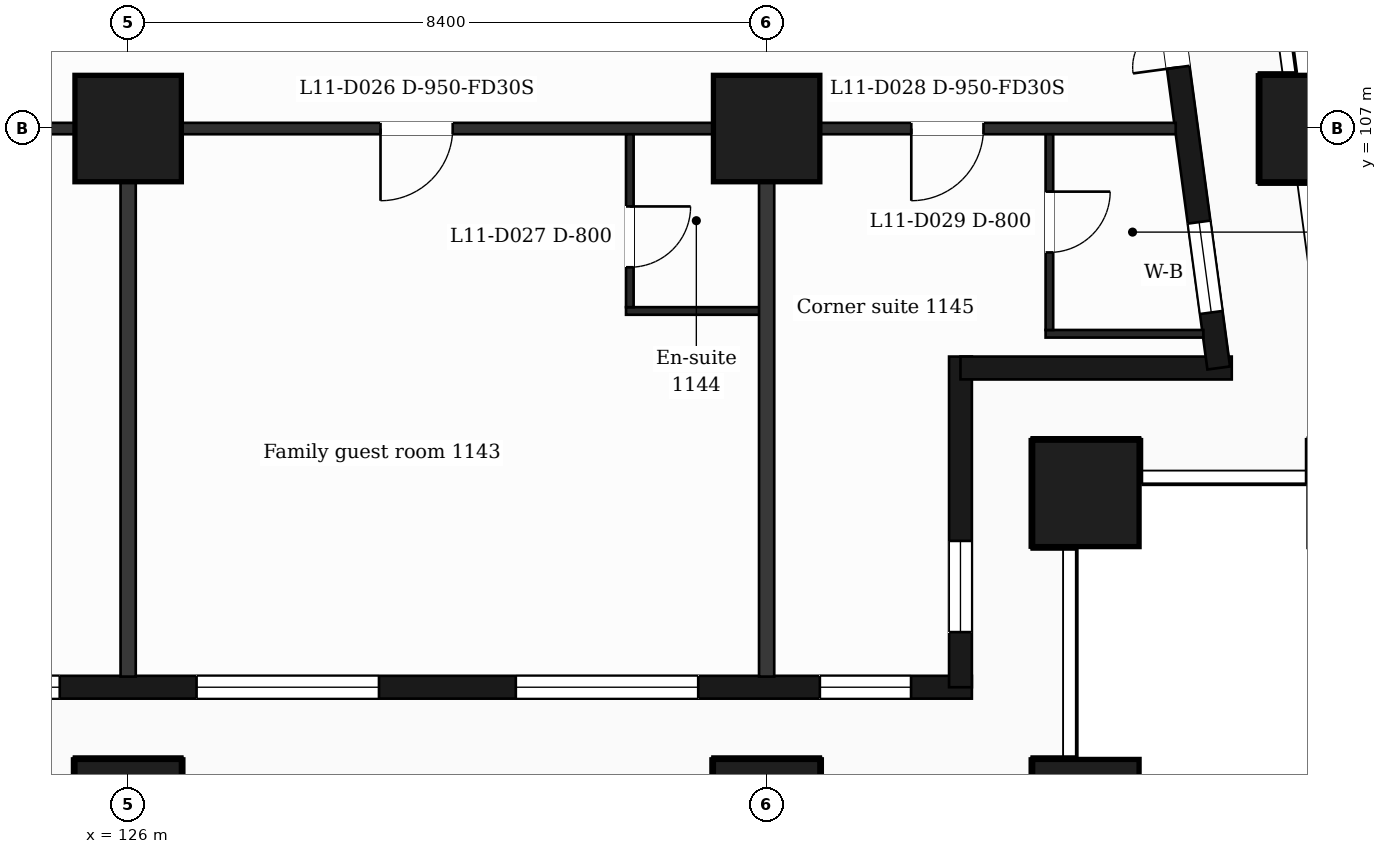
"""IFC4 building model, lengths in metres.
Left out: names, types, materials, properties, quantities, classifications, styles, units other than length and angle.
Written with IfcOpenShell. Run it as: python <this file> out.ifc"""

import sys

from ifc_helpers import new_model, si_unit, direction, frame, frame_2d, origin, origin_2d, place, context, subcontext, project, spatial, rectangle, extrude, element, fill, save


model = new_model("IFC4")
c1 = context("Model", 3, precision=1e-05, world=origin(), true_north=direction((0.0, 1.0)))
c2 = subcontext(c1, "Body", "Model", "MODEL_VIEW")
j1 = project(units=[si_unit("LENGTHUNIT", "METRE"), si_unit("PLANEANGLEUNIT", "RADIAN")], contexts=[c1])
p1 = place(None, origin())
s1 = spatial("IfcSite", under=j1, at=p1, CompositionType="ELEMENT")
p2 = place(p1, origin())
s2 = spatial("IfcBuilding", under=s1, at=p2, CompositionType="ELEMENT")
p3 = place(p2, frame((0.0, 0.0, 56.5)))
s3 = spatial("IfcBuildingStorey", under=s2, at=p3, CompositionType="ELEMENT", Elevation=56.5)
for number, where, z_axis, x_axis in (
    (1, (126.0, 98.0, 0.0), (0.0, 0.0, 1.0), (1.0, 0.0, 0.0)),
    (2, (134.4, 98.0, 0.0), (0.0, 0.0, 1.0), (1.0, 0.0, 0.0)),
    (3, (138.6, 98.0, 0.0), (0.0, 0.0, 1.0), (1.0, 0.0, 0.0)),
    (4, (138.6, 102.2, 0.0), (0.0, 0.0, 1.0), (1.0, 0.0, 0.0)),
    (5, (126.0, 107.0, 0.0), (0.0, 0.0, 1.0), (1.0, 0.0, 0.0)),
    (6, (134.4, 107.0, 0.0), (0.0, 0.0, 1.0), (1.0, 0.0, 0.0)),
    (7, (141.588, 107.0, 0.0), (0.0, 0.0, 1.0), (1.0, 0.0, 0.0)),
):
    element("IfcColumn", number, at=place(p3, frame(where, z_axis=z_axis, x_axis=x_axis)), inside=s3, PredefinedType="COLUMN", context=c2, shape_type="SweptSolid", body=[
        extrude(rectangle(XDim=1.4, YDim=1.4, at=origin_2d()), origin(), (0.0, 0.0, 1.0), 3.5),
    ])
p4 = place(p3, frame((89.85, 99.65, 0.0), z_axis=(0.0, 0.0, 1.0), x_axis=(1.0, 0.0, 0.0)))
e8 = element("IfcWall", 8, at=p4, inside=s3, PredefinedType="SOLIDWALL", context=c2, shape_type="SweptSolid", body=[
    extrude(rectangle(XDim=47.25, YDim=0.3, at=frame_2d((23.625, 0.0))), origin(), (0.0, 0.0, 1.0), 3.18),
])
p5 = place(p4, frame((0.725, 0.0, 0.9)))
e9 = element("IfcOpeningElement", 9, at=p5, cuts=e8, PredefinedType="OPENING", context=c2, shape_type="SweptSolid", body=[
    extrude(rectangle(XDim=1.2, YDim=2.1, at=frame_2d((0.6, 1.05))), frame((0.0, 0.16, 0.0), z_axis=(0.0, -1.0, 0.0), x_axis=(1.0, 0.0, 0.0)), (0.0, 0.0, 1.0), 0.32),
])
p6 = place(p4, frame((3.45, 0.0, 0.9)))
e10 = element("IfcOpeningElement", 10, at=p6, cuts=e8, PredefinedType="OPENING", context=c2, shape_type="SweptSolid", body=[
    extrude(rectangle(XDim=2.4, YDim=2.1, at=frame_2d((1.2, 1.05))), frame((0.0, 0.16, 0.0), z_axis=(0.0, -1.0, 0.0), x_axis=(1.0, 0.0, 0.0)), (0.0, 0.0, 1.0), 0.32),
])
p7 = place(p4, frame((7.35, 0.0, 0.0)))
e11 = element("IfcOpeningElement", 11, at=p7, cuts=e8, PredefinedType="OPENING", context=c2, shape_type="SweptSolid", body=[
    extrude(rectangle(XDim=1.2, YDim=2.4, at=frame_2d((0.6, 1.2))), frame((0.0, 0.16, 0.0), z_axis=(0.0, -1.0, 0.0), x_axis=(1.0, 0.0, 0.0)), (0.0, 0.0, 1.0), 0.32),
])
p8 = place(p4, frame((9.15, 0.0, 0.9)))
e12 = element("IfcOpeningElement", 12, at=p8, cuts=e8, PredefinedType="OPENING", context=c2, shape_type="SweptSolid", body=[
    extrude(rectangle(XDim=1.2, YDim=2.1, at=frame_2d((0.6, 1.05))), frame((0.0, 0.16, 0.0), z_axis=(0.0, -1.0, 0.0), x_axis=(1.0, 0.0, 0.0)), (0.0, 0.0, 1.0), 0.32),
])
p9 = place(p4, frame((11.85, 0.0, 0.9)))
e13 = element("IfcOpeningElement", 13, at=p9, cuts=e8, PredefinedType="OPENING", context=c2, shape_type="SweptSolid", body=[
    extrude(rectangle(XDim=2.4, YDim=2.1, at=frame_2d((1.2, 1.05))), frame((0.0, 0.16, 0.0), z_axis=(0.0, -1.0, 0.0), x_axis=(1.0, 0.0, 0.0)), (0.0, 0.0, 1.0), 0.32),
])
p10 = place(p4, frame((16.05, 0.0, 0.9)))
e14 = element("IfcOpeningElement", 14, at=p10, cuts=e8, PredefinedType="OPENING", context=c2, shape_type="SweptSolid", body=[
    extrude(rectangle(XDim=2.4, YDim=2.1, at=frame_2d((1.2, 1.05))), frame((0.0, 0.16, 0.0), z_axis=(0.0, -1.0, 0.0), x_axis=(1.0, 0.0, 0.0)), (0.0, 0.0, 1.0), 0.32),
])
p11 = place(p4, frame((20.85, 0.0, 0.9)))
e15 = element("IfcOpeningElement", 15, at=p11, cuts=e8, PredefinedType="OPENING", context=c2, shape_type="SweptSolid", body=[
    extrude(rectangle(XDim=1.2, YDim=2.1, at=frame_2d((0.6, 1.05))), frame((0.0, 0.16, 0.0), z_axis=(0.0, -1.0, 0.0), x_axis=(1.0, 0.0, 0.0)), (0.0, 0.0, 1.0), 0.32),
])
p12 = place(p4, frame((25.05, 0.0, 0.9)))
e16 = element("IfcOpeningElement", 16, at=p12, cuts=e8, PredefinedType="OPENING", context=c2, shape_type="SweptSolid", body=[
    extrude(rectangle(XDim=1.2, YDim=2.1, at=frame_2d((0.6, 1.05))), frame((0.0, 0.16, 0.0), z_axis=(0.0, -1.0, 0.0), x_axis=(1.0, 0.0, 0.0)), (0.0, 0.0, 1.0), 0.32),
])
p13 = place(p4, frame((28.65, 0.0, 0.9)))
e17 = element("IfcOpeningElement", 17, at=p13, cuts=e8, PredefinedType="OPENING", context=c2, shape_type="SweptSolid", body=[
    extrude(rectangle(XDim=2.4, YDim=2.1, at=frame_2d((1.2, 1.05))), frame((0.0, 0.16, 0.0), z_axis=(0.0, -1.0, 0.0), x_axis=(1.0, 0.0, 0.0)), (0.0, 0.0, 1.0), 0.32),
])
p14 = place(p4, frame((32.85, 0.0, 0.9)))
e18 = element("IfcOpeningElement", 18, at=p14, cuts=e8, PredefinedType="OPENING", context=c2, shape_type="SweptSolid", body=[
    extrude(rectangle(XDim=2.4, YDim=2.1, at=frame_2d((1.2, 1.05))), frame((0.0, 0.16, 0.0), z_axis=(0.0, -1.0, 0.0), x_axis=(1.0, 0.0, 0.0)), (0.0, 0.0, 1.0), 0.32),
])
p15 = place(p4, frame((37.05, 0.0, 0.9)))
e19 = element("IfcOpeningElement", 19, at=p15, cuts=e8, PredefinedType="OPENING", context=c2, shape_type="SweptSolid", body=[
    extrude(rectangle(XDim=2.4, YDim=2.1, at=frame_2d((1.2, 1.05))), frame((0.0, 0.16, 0.0), z_axis=(0.0, -1.0, 0.0), x_axis=(1.0, 0.0, 0.0)), (0.0, 0.0, 1.0), 0.32),
])
p16 = place(p4, frame((41.25, 0.0, 0.9)))
e20 = element("IfcOpeningElement", 20, at=p16, cuts=e8, PredefinedType="OPENING", context=c2, shape_type="SweptSolid", body=[
    extrude(rectangle(XDim=2.4, YDim=2.1, at=frame_2d((1.2, 1.05))), frame((0.0, 0.16, 0.0), z_axis=(0.0, -1.0, 0.0), x_axis=(1.0, 0.0, 0.0)), (0.0, 0.0, 1.0), 0.32),
])
p17 = place(p4, frame((45.25, 0.0, 0.9)))
e21 = element("IfcOpeningElement", 21, at=p17, cuts=e8, PredefinedType="OPENING", context=c2, shape_type="SweptSolid", body=[
    extrude(rectangle(XDim=1.2, YDim=2.1, at=frame_2d((0.6, 1.05))), frame((0.0, 0.16, 0.0), z_axis=(0.0, -1.0, 0.0), x_axis=(1.0, 0.0, 0.0)), (0.0, 0.0, 1.0), 0.32),
])
p18 = place(p3, frame((136.95, 99.65, 0.0), z_axis=(0.0, 0.0, 1.0), x_axis=(0.0, 1.0, 0.0)))
e22 = element("IfcWall", 22, at=p18, inside=s3, PredefinedType="SOLIDWALL", context=c2, shape_type="SweptSolid", body=[
    extrude(rectangle(XDim=4.35, YDim=0.3, at=frame_2d((2.175, 0.0))), origin(), (0.0, 0.0, 1.0), 3.18),
])
p19 = place(p18, frame((0.725, 0.0, 0.9)))
e23 = element("IfcOpeningElement", 23, at=p19, cuts=e22, PredefinedType="OPENING", context=c2, shape_type="SweptSolid", body=[
    extrude(rectangle(XDim=1.2, YDim=2.1, at=frame_2d((0.6, 1.05))), frame((0.0, 0.16, 0.0), z_axis=(0.0, -1.0, 0.0), x_axis=(1.0, 0.0, 0.0)), (0.0, 0.0, 1.0), 0.32),
])
p20 = place(p3, frame((136.95, 103.85, 0.0), z_axis=(0.0, 0.0, 1.0), x_axis=(1.0, 0.0, 0.0)))
e24 = element("IfcWall", 24, at=p20, inside=s3, PredefinedType="SOLIDWALL", context=c2, shape_type="SweptSolid", body=[
    extrude(rectangle(XDim=3.569, YDim=0.3, at=frame_2d((1.785, 0.0))), origin(), (0.0, 0.0, 1.0), 3.18),
])
p21 = place(p3, frame((140.348, 103.85, 0.0), z_axis=(0.0, 0.0, 1.0), x_axis=(-0.133431549479, 0.991058031401, 0.0)))
e25 = element("IfcWall", 25, at=p21, inside=s3, PredefinedType="SOLIDWALL", context=c2, shape_type="SweptSolid", body=[
    extrude(rectangle(XDim=6.609, YDim=0.3, at=frame_2d((3.304, 0.0))), origin(), (0.0, 0.0, 1.0), 3.18),
])
p22 = place(p21, frame((0.737, 0.0, 0.9)))
e26 = element("IfcOpeningElement", 26, at=p22, cuts=e25, PredefinedType="OPENING", context=c2, shape_type="SweptSolid", body=[
    extrude(rectangle(XDim=1.2, YDim=2.1, at=frame_2d((0.6, 1.05))), frame((0.0, 0.16, 0.0), z_axis=(0.0, -1.0, 0.0), x_axis=(1.0, 0.0, 0.0)), (0.0, 0.0, 1.0), 0.32),
])
p23 = place(p21, frame((3.991, 0.0, 0.0)))
e27 = element("IfcOpeningElement", 27, at=p23, cuts=e25, PredefinedType="OPENING", context=c2, shape_type="SweptSolid", body=[
    extrude(rectangle(XDim=1.2, YDim=2.4, at=frame_2d((0.6, 1.2))), frame((0.0, 0.16, 0.0), z_axis=(0.0, -1.0, 0.0), x_axis=(1.0, 0.0, 0.0)), (0.0, 0.0, 1.0), 0.32),
])
p24 = place(p3, frame((138.07, 104.3, 0.0), z_axis=(0.0, 0.0, 1.0), x_axis=(1.0, 0.0, 0.0)))
e28 = element("IfcWall", 28, at=p24, inside=s3, PredefinedType="PARTITIONING", context=c2, shape_type="SweptSolid", body=[
    extrude(rectangle(XDim=2.076, YDim=0.1, at=frame_2d((1.038, 0.0))), origin(), (0.0, 0.0, 1.0), 3.18),
])
p25 = place(p3, frame((132.55, 104.6, 0.0), z_axis=(0.0, 0.0, 1.0), x_axis=(1.0, 0.0, 0.0)))
e29 = element("IfcWall", 29, at=p25, inside=s3, PredefinedType="PARTITIONING", context=c2, shape_type="SweptSolid", body=[
    extrude(rectangle(XDim=1.85, YDim=0.1, at=frame_2d((0.925, 0.0))), origin(), (0.0, 0.0, 1.0), 3.18),
])
p26 = place(p3, frame((87.018, 107.0, 0.0), z_axis=(0.0, 0.0, 1.0), x_axis=(1.0, 0.0, 0.0)))
e30 = element("IfcWall", 30, at=p26, inside=s3, PredefinedType="PARTITIONING", context=c2, shape_type="SweptSolid", body=[
    extrude(rectangle(XDim=52.765, YDim=0.15, at=frame_2d((26.382, 0.0))), origin(), (0.0, 0.0, 1.0), 3.18),
])
p27 = place(p26, frame((1.032, 0.0, 0.0)))
e31 = element("IfcOpeningElement", 31, at=p27, cuts=e30, PredefinedType="OPENING", context=c2, shape_type="SweptSolid", body=[
    extrude(rectangle(XDim=0.95, YDim=2.1, at=frame_2d((0.475, 1.05))), frame((0.0, 0.085, 0.0), z_axis=(0.0, -1.0, 0.0), x_axis=(1.0, 0.0, 0.0)), (0.0, 0.0, 1.0), 0.17),
])
p28 = place(p26, frame((6.894, 0.0, 0.0)))
e32 = element("IfcOpeningElement", 32, at=p28, cuts=e30, PredefinedType="OPENING", context=c2, shape_type="SweptSolid", body=[
    extrude(rectangle(XDim=0.95, YDim=2.1, at=frame_2d((0.475, 1.05))), frame((0.0, 0.085, 0.0), z_axis=(0.0, -1.0, 0.0), x_axis=(1.0, 0.0, 0.0)), (0.0, 0.0, 1.0), 0.17),
])
p29 = place(p26, frame((17.844, 0.0, 0.0)))
e33 = element("IfcOpeningElement", 33, at=p29, cuts=e30, PredefinedType="OPENING", context=c2, shape_type="SweptSolid", body=[
    extrude(rectangle(XDim=0.95, YDim=2.1, at=frame_2d((0.475, 1.05))), frame((0.0, 0.085, 0.0), z_axis=(0.0, -1.0, 0.0), x_axis=(1.0, 0.0, 0.0)), (0.0, 0.0, 1.0), 0.17),
])
p30 = place(p26, frame((26.245, 0.0, 0.0)))
e34 = element("IfcOpeningElement", 34, at=p30, cuts=e30, PredefinedType="OPENING", context=c2, shape_type="SweptSolid", body=[
    extrude(rectangle(XDim=0.95, YDim=2.1, at=frame_2d((0.475, 1.05))), frame((0.0, 0.085, 0.0), z_axis=(0.0, -1.0, 0.0), x_axis=(1.0, 0.0, 0.0)), (0.0, 0.0, 1.0), 0.17),
])
p31 = place(p26, frame((35.822, 0.0, 0.0)))
e35 = element("IfcOpeningElement", 35, at=p31, cuts=e30, PredefinedType="OPENING", context=c2, shape_type="SweptSolid", body=[
    extrude(rectangle(XDim=0.95, YDim=2.1, at=frame_2d((0.475, 1.05))), frame((0.0, 0.085, 0.0), z_axis=(0.0, -1.0, 0.0), x_axis=(1.0, 0.0, 0.0)), (0.0, 0.0, 1.0), 0.17),
])
p32 = place(p26, frame((42.302, 0.0, 0.0)))
e36 = element("IfcOpeningElement", 36, at=p32, cuts=e30, PredefinedType="OPENING", context=c2, shape_type="SweptSolid", body=[
    extrude(rectangle(XDim=0.95, YDim=2.1, at=frame_2d((0.475, 1.05))), frame((0.0, 0.085, 0.0), z_axis=(0.0, -1.0, 0.0), x_axis=(1.0, 0.0, 0.0)), (0.0, 0.0, 1.0), 0.17),
])
p33 = place(p26, frame((49.285, 0.0, 0.0)))
e37 = element("IfcOpeningElement", 37, at=p33, cuts=e30, PredefinedType="OPENING", context=c2, shape_type="SweptSolid", body=[
    extrude(rectangle(XDim=0.95, YDim=2.1, at=frame_2d((0.475, 1.05))), frame((0.0, 0.085, 0.0), z_axis=(0.0, -1.0, 0.0), x_axis=(1.0, 0.0, 0.0)), (0.0, 0.0, 1.0), 0.17),
])
p34 = place(p3, frame((126.0, 99.79, 0.0), z_axis=(0.0, 0.0, 1.0), x_axis=(0.0, 1.0, 0.0)))
e38 = element("IfcWall", 38, at=p34, inside=s3, PredefinedType="PARTITIONING", context=c2, shape_type="SweptSolid", body=[
    extrude(rectangle(XDim=7.135, YDim=0.2, at=frame_2d((3.567, 0.0))), origin(), (0.0, 0.0, 1.0), 3.18),
])
p35 = place(p3, frame((132.6, 104.65, 0.0), z_axis=(0.0, 0.0, 1.0), x_axis=(0.0, 1.0, 0.0)))
e39 = element("IfcWall", 39, at=p35, inside=s3, PredefinedType="PARTITIONING", context=c2, shape_type="SweptSolid", body=[
    extrude(rectangle(XDim=2.275, YDim=0.1, at=frame_2d((1.138, 0.0))), origin(), (0.0, 0.0, 1.0), 3.18),
])
p36 = place(p35, frame((0.525, 0.0, 0.0)))
e40 = element("IfcOpeningElement", 40, at=p36, cuts=e39, PredefinedType="OPENING", context=c2, shape_type="SweptSolid", body=[
    extrude(rectangle(XDim=0.8, YDim=2.1, at=frame_2d((0.4, 1.05))), frame((0.0, 0.06, 0.0), z_axis=(0.0, -1.0, 0.0), x_axis=(1.0, 0.0, 0.0)), (0.0, 0.0, 1.0), 0.12),
])
p37 = place(p3, frame((134.4, 99.79, 0.0), z_axis=(0.0, 0.0, 1.0), x_axis=(0.0, 1.0, 0.0)))
e41 = element("IfcWall", 41, at=p37, inside=s3, PredefinedType="PARTITIONING", context=c2, shape_type="SweptSolid", body=[
    extrude(rectangle(XDim=7.135, YDim=0.2, at=frame_2d((3.567, 0.0))), origin(), (0.0, 0.0, 1.0), 3.18),
])
p38 = place(p3, frame((138.12, 104.35, 0.0), z_axis=(0.0, 0.0, 1.0), x_axis=(0.0, 1.0, 0.0)))
e42 = element("IfcWall", 42, at=p38, inside=s3, PredefinedType="PARTITIONING", context=c2, shape_type="SweptSolid", body=[
    extrude(rectangle(XDim=2.575, YDim=0.1, at=frame_2d((1.288, 0.0))), origin(), (0.0, 0.0, 1.0), 3.18),
])
p39 = place(p38, frame((1.02, 0.0, 0.0)))
e43 = element("IfcOpeningElement", 43, at=p39, cuts=e42, PredefinedType="OPENING", context=c2, shape_type="SweptSolid", body=[
    extrude(rectangle(XDim=0.8, YDim=2.1, at=frame_2d((0.4, 1.05))), frame((0.0, 0.06, 0.0), z_axis=(0.0, -1.0, 0.0), x_axis=(1.0, 0.0, 0.0)), (0.0, 0.0, 1.0), 0.12),
])
p40 = place(p14, origin())
e44 = element("IfcWindow", 44, at=p40, inside=s3, PartitioningType="SINGLE_PANEL", PredefinedType="WINDOW", context=c2, shape_type="SweptSolid", body=[
    extrude(rectangle(XDim=2.4, YDim=2.1, at=frame_2d((1.2, 1.05))), frame((0.0, 0.03, 0.0), z_axis=(0.0, -1.0, 0.0), x_axis=(1.0, 0.0, 0.0)), (0.0, 0.0, 1.0), 0.06),
])
fill(e18, e44)
p41 = place(p15, origin())
e45 = element("IfcWindow", 45, at=p41, inside=s3, PartitioningType="SINGLE_PANEL", PredefinedType="WINDOW", context=c2, shape_type="SweptSolid", body=[
    extrude(rectangle(XDim=2.4, YDim=2.1, at=frame_2d((1.2, 1.05))), frame((0.0, 0.03, 0.0), z_axis=(0.0, -1.0, 0.0), x_axis=(1.0, 0.0, 0.0)), (0.0, 0.0, 1.0), 0.06),
])
fill(e19, e45)
p42 = place(p16, origin())
e46 = element("IfcWindow", 46, at=p42, inside=s3, PartitioningType="SINGLE_PANEL", PredefinedType="WINDOW", context=c2, shape_type="SweptSolid", body=[
    extrude(rectangle(XDim=2.4, YDim=2.1, at=frame_2d((1.2, 1.05))), frame((0.0, 0.03, 0.0), z_axis=(0.0, -1.0, 0.0), x_axis=(1.0, 0.0, 0.0)), (0.0, 0.0, 1.0), 0.06),
])
fill(e20, e46)
p43 = place(p17, origin())
e47 = element("IfcWindow", 47, at=p43, inside=s3, PartitioningType="SINGLE_PANEL", PredefinedType="WINDOW", context=c2, shape_type="SweptSolid", body=[
    extrude(rectangle(XDim=1.2, YDim=2.1, at=frame_2d((0.6, 1.05))), frame((0.0, 0.03, 0.0), z_axis=(0.0, -1.0, 0.0), x_axis=(1.0, 0.0, 0.0)), (0.0, 0.0, 1.0), 0.06),
])
fill(e21, e47)
p44 = place(p19, origin())
e48 = element("IfcWindow", 48, at=p44, inside=s3, PartitioningType="SINGLE_PANEL", PredefinedType="WINDOW", context=c2, shape_type="SweptSolid", body=[
    extrude(rectangle(XDim=1.2, YDim=2.1, at=frame_2d((0.6, 1.05))), frame((0.0, 0.03, 0.0), z_axis=(0.0, -1.0, 0.0), x_axis=(1.0, 0.0, 0.0)), (0.0, 0.0, 1.0), 0.06),
])
fill(e23, e48)
p45 = place(p22, origin())
e49 = element("IfcWindow", 49, at=p45, inside=s3, PartitioningType="SINGLE_PANEL", PredefinedType="WINDOW", context=c2, shape_type="SweptSolid", body=[
    extrude(rectangle(XDim=1.2, YDim=2.1, at=frame_2d((0.6, 1.05))), frame((0.0, 0.03, 0.0), z_axis=(0.0, -1.0, 0.0), x_axis=(1.0, 0.0, 0.0)), (0.0, 0.0, 1.0), 0.06),
])
fill(e26, e49)
p46 = place(p23, origin())
e50 = element("IfcDoor", 50, at=p46, inside=s3, OperationType="DOUBLE_DOOR_SINGLE_SWING", PredefinedType="DOOR", context=c2, shape_type="SweptSolid", body=[
    extrude(rectangle(XDim=1.2, YDim=2.4, at=frame_2d((0.6, 1.2))), frame((0.0, 0.025, 0.0), z_axis=(0.0, -1.0, 0.0), x_axis=(1.0, 0.0, 0.0)), (0.0, 0.0, 1.0), 0.05),
])
fill(e27, e50)
p47 = place(p32, origin())
e51 = element("IfcDoor", 51, at=p47, inside=s3, OperationType="SINGLE_SWING_LEFT", PredefinedType="DOOR", context=c2, shape_type="SweptSolid", body=[
    extrude(rectangle(XDim=0.95, YDim=2.1, at=frame_2d((0.475, 1.05))), frame((0.0, 0.025, 0.0), z_axis=(0.0, -1.0, 0.0), x_axis=(1.0, 0.0, 0.0)), (0.0, 0.0, 1.0), 0.05),
])
fill(e36, e51)
p48 = place(p36, origin())
e52 = element("IfcDoor", 52, at=p48, inside=s3, OperationType="SINGLE_SWING_RIGHT", PredefinedType="DOOR", context=c2, shape_type="SweptSolid", body=[
    extrude(rectangle(XDim=0.8, YDim=2.1, at=frame_2d((0.4, 1.05))), frame((0.0, 0.025, 0.0), z_axis=(0.0, -1.0, 0.0), x_axis=(1.0, 0.0, 0.0)), (0.0, 0.0, 1.0), 0.05),
])
fill(e40, e52)
p49 = place(p33, origin())
e53 = element("IfcDoor", 53, at=p49, inside=s3, OperationType="SINGLE_SWING_LEFT", PredefinedType="DOOR", context=c2, shape_type="SweptSolid", body=[
    extrude(rectangle(XDim=0.95, YDim=2.1, at=frame_2d((0.475, 1.05))), frame((0.0, 0.025, 0.0), z_axis=(0.0, -1.0, 0.0), x_axis=(1.0, 0.0, 0.0)), (0.0, 0.0, 1.0), 0.05),
])
fill(e37, e53)
p50 = place(p39, origin())
e54 = element("IfcDoor", 54, at=p50, inside=s3, OperationType="SINGLE_SWING_RIGHT", PredefinedType="DOOR", context=c2, shape_type="SweptSolid", body=[
    extrude(rectangle(XDim=0.8, YDim=2.1, at=frame_2d((0.4, 1.05))), frame((0.0, 0.025, 0.0), z_axis=(0.0, -1.0, 0.0), x_axis=(1.0, 0.0, 0.0)), (0.0, 0.0, 1.0), 0.05),
])
fill(e43, e54)
save(model, sys.argv[1])
